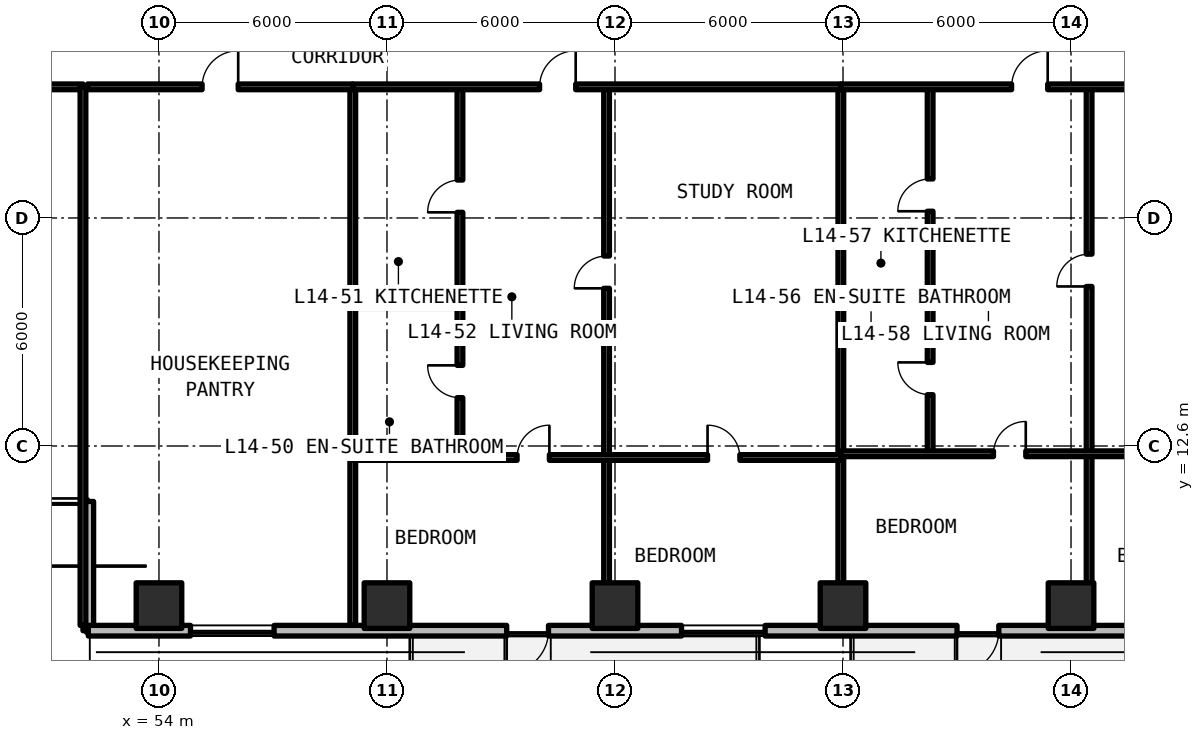
"""IFC4 building model, lengths in metres.
Left out: names, types, materials, properties, quantities, classifications, styles, units other than length and angle.
Written with IfcOpenShell. Run it as: python <this file> out.ifc"""

import sys

from ifc_helpers import new_model, si_unit, direction, frame, frame_2d, origin, origin_2d, place, context, subcontext, project, spatial, rectangle, extrude, element, fill, save


model = new_model("IFC4")
c1 = context("Model", 3, precision=1e-05, world=origin(), true_north=direction((0.0, 1.0)))
c2 = subcontext(c1, "Body", "Model", "MODEL_VIEW")
j1 = project(units=[si_unit("LENGTHUNIT", "METRE"), si_unit("PLANEANGLEUNIT", "RADIAN")], contexts=[c1])
p1 = place(None, origin())
s1 = spatial("IfcSite", under=j1, at=p1, CompositionType="ELEMENT")
p2 = place(p1, origin())
s2 = spatial("IfcBuilding", under=s1, at=p2, CompositionType="ELEMENT")
p3 = place(p2, frame((0.0, 0.0, 52.14)))
s3 = spatial("IfcBuildingStorey", under=s2, at=p3, CompositionType="ELEMENT", Elevation=52.14)
for number, where, z_axis, x_axis in (
    (1, (54.0, 8.4, 0.0), (0.0, 0.0, 1.0), (1.0, 0.0, 0.0)),
    (2, (60.0, 8.4, 0.0), (0.0, 0.0, 1.0), (1.0, 0.0, 0.0)),
    (3, (66.0, 8.4, 0.0), (0.0, 0.0, 1.0), (1.0, 0.0, 0.0)),
    (4, (72.0, 8.4, 0.0), (0.0, 0.0, 1.0), (1.0, 0.0, 0.0)),
    (5, (78.0, 8.4, 0.0), (0.0, 0.0, 1.0), (1.0, 0.0, 0.0)),
):
    element("IfcColumn", number, at=place(p3, frame(where, z_axis=z_axis, x_axis=x_axis)), inside=s3, PredefinedType="COLUMN", context=c2, shape_type="SweptSolid", body=[
        extrude(rectangle(XDim=1.2, YDim=1.2, at=origin_2d()), origin(), (0.0, 0.0, 1.0), 3.3),
    ])
p4 = place(p3, frame((52.14, 11.14, 0.0), z_axis=(0.0, 0.0, 1.0), x_axis=(0.0, -1.0, 0.0)))
e6 = element("IfcWall", 6, at=p4, inside=s3, PredefinedType="SOLIDWALL", context=c2, shape_type="SweptSolid", body=[
    extrude(rectangle(XDim=3.4, YDim=0.28, at=frame_2d((1.7, 0.0))), origin(), (0.0, 0.0, 1.0), 3.08),
])
p5 = place(p3, frame((52.14, 7.74, 0.0), z_axis=(0.0, 0.0, 1.0), x_axis=(1.0, 0.0, 0.0)))
e7 = element("IfcWall", 7, at=p5, inside=s3, PredefinedType="SOLIDWALL", context=c2, shape_type="SweptSolid", body=[
    extrude(rectangle(XDim=44.402, YDim=0.28, at=frame_2d((22.201, 0.0))), origin(), (0.0, 0.0, 1.0), 3.08),
])
p6 = place(p5, frame((11.01, 0.0, 0.0)))
e8 = element("IfcOpeningElement", 8, at=p6, cuts=e7, PredefinedType="OPENING", context=c2, shape_type="SweptSolid", body=[
    extrude(rectangle(XDim=1.1, YDim=2.15, at=frame_2d((0.55, 1.075))), frame((0.0, 0.15, 0.0), z_axis=(0.0, -1.0, 0.0), x_axis=(1.0, 0.0, 0.0)), (0.0, 0.0, 1.0), 0.3),
])
p7 = place(p5, frame((22.86, 0.0, 0.0)))
e9 = element("IfcOpeningElement", 9, at=p7, cuts=e7, PredefinedType="OPENING", context=c2, shape_type="SweptSolid", body=[
    extrude(rectangle(XDim=1.1, YDim=2.15, at=frame_2d((0.55, 1.075))), frame((0.0, 0.15, 0.0), z_axis=(0.0, -1.0, 0.0), x_axis=(1.0, 0.0, 0.0)), (0.0, 0.0, 1.0), 0.3),
])
p8 = place(p5, frame((34.96, 0.0, 0.0)))
e10 = element("IfcOpeningElement", 10, at=p8, cuts=e7, PredefinedType="OPENING", context=c2, shape_type="SweptSolid", body=[
    extrude(rectangle(XDim=1.1, YDim=2.15, at=frame_2d((0.55, 1.075))), frame((0.0, 0.15, 0.0), z_axis=(0.0, -1.0, 0.0), x_axis=(1.0, 0.0, 0.0)), (0.0, 0.0, 1.0), 0.3),
])
p9 = place(p5, frame((2.69, 0.0, 0.78)))
e11 = element("IfcOpeningElement", 11, at=p9, cuts=e7, PredefinedType="OPENING", context=c2, shape_type="SweptSolid", body=[
    extrude(rectangle(XDim=2.2, YDim=1.66, at=frame_2d((1.1, 0.83))), frame((0.0, 0.15, 0.0), z_axis=(0.0, -1.0, 0.0), x_axis=(1.0, 0.0, 0.0)), (0.0, 0.0, 1.0), 0.3),
])
p10 = place(p5, frame((15.61, 0.0, 0.78)))
e12 = element("IfcOpeningElement", 12, at=p10, cuts=e7, PredefinedType="OPENING", context=c2, shape_type="SweptSolid", body=[
    extrude(rectangle(XDim=2.2, YDim=1.66, at=frame_2d((1.1, 0.83))), frame((0.0, 0.15, 0.0), z_axis=(0.0, -1.0, 0.0), x_axis=(1.0, 0.0, 0.0)), (0.0, 0.0, 1.0), 0.3),
])
p11 = place(p5, frame((28.241, 0.0, 0.78)))
e13 = element("IfcOpeningElement", 13, at=p11, cuts=e7, PredefinedType="OPENING", context=c2, shape_type="SweptSolid", body=[
    extrude(rectangle(XDim=2.2, YDim=1.66, at=frame_2d((1.1, 0.83))), frame((0.0, 0.15, 0.0), z_axis=(0.0, -1.0, 0.0), x_axis=(1.0, 0.0, 0.0)), (0.0, 0.0, 1.0), 0.3),
])
p12 = place(p3, frame((43.6, 22.05, 0.0), z_axis=(0.0, 0.0, 1.0), x_axis=(1.0, 0.0, 0.0)))
e14 = element("IfcWall", 14, at=p12, inside=s3, PredefinedType="SOLIDWALL", context=c2, shape_type="SweptSolid", body=[
    extrude(rectangle(XDim=8.4, YDim=0.15, at=frame_2d((4.2, 0.0))), origin(), (0.0, 0.0, 1.0), 2.35),
])
p13 = place(p12, frame((3.65, 0.0, 0.0)))
e15 = element("IfcOpeningElement", 15, at=p13, cuts=e14, PredefinedType="OPENING", context=c2, shape_type="SweptSolid", body=[
    extrude(rectangle(XDim=1.1, YDim=2.15, at=frame_2d((0.55, 1.075))), frame((0.0, 0.085, 0.0), z_axis=(0.0, -1.0, 0.0), x_axis=(1.0, 0.0, 0.0)), (0.0, 0.0, 1.0), 0.17),
])
for number, where, z_axis, x_axis in (
    (16, (52.0, 7.88, 0.0), (0.0, 0.0, 1.0), (0.0, 1.0, 0.0)),
    (17, (59.1, 7.88, 0.0), (0.0, 0.0, 1.0), (0.0, 1.0, 0.0)),
):
    element("IfcWall", number, at=place(p3, frame(where, z_axis=z_axis, x_axis=x_axis)), inside=s3, PredefinedType="SOLIDWALL", context=c2, shape_type="SweptSolid", body=[
        extrude(rectangle(XDim=14.17, YDim=0.15, at=frame_2d((7.085, 0.0))), origin(), (0.0, 0.0, 1.0), 2.35),
    ])
p14 = place(p3, frame((52.12, 22.05, 0.0), z_axis=(0.0, 0.0, 1.0), x_axis=(1.0, 0.0, 0.0)))
e18 = element("IfcWall", 18, at=p14, inside=s3, PredefinedType="SOLIDWALL", context=c2, shape_type="SweptSolid", body=[
    extrude(rectangle(XDim=6.98, YDim=0.15, at=frame_2d((3.49, 0.0))), origin(), (0.0, 0.0, 1.0), 2.35),
])
p15 = place(p14, frame((3.015, 0.0, 0.0)))
e19 = element("IfcOpeningElement", 19, at=p15, cuts=e18, PredefinedType="OPENING", context=c2, shape_type="SweptSolid", body=[
    extrude(rectangle(XDim=0.95, YDim=2.15, at=frame_2d((0.475, 1.075))), frame((0.0, 0.085, 0.0), z_axis=(0.0, -1.0, 0.0), x_axis=(1.0, 0.0, 0.0)), (0.0, 0.0, 1.0), 0.17),
])
p16 = place(p3, frame((71.943, 7.88, 0.0), z_axis=(0.0, 0.0, 1.0), x_axis=(0.0, 1.0, 0.0)))
e20 = element("IfcWall", 20, at=p16, inside=s3, PredefinedType="SOLIDWALL", context=c2, shape_type="SweptSolid", body=[
    extrude(rectangle(XDim=14.17, YDim=0.15, at=frame_2d((7.085, 0.0))), origin(), (0.0, 0.0, 1.0), 2.35),
])
p17 = place(p3, frame((65.778, 12.297, 0.0), z_axis=(0.0, 0.0, 1.0), x_axis=(0.0, 1.0, 0.0)))
e21 = element("IfcWall", 21, at=p17, inside=s3, PredefinedType="PARTITIONING", context=c2, shape_type="SweptSolid", body=[
    extrude(rectangle(XDim=9.753, YDim=0.15, at=frame_2d((4.876, 0.0))), origin(), (0.0, 0.0, 1.0), 2.35),
])
p18 = place(p17, frame((4.451, 0.0, 0.0)))
e22 = element("IfcOpeningElement", 22, at=p18, cuts=e21, PredefinedType="OPENING", context=c2, shape_type="SweptSolid", body=[
    extrude(rectangle(XDim=0.85, YDim=2.1, at=frame_2d((0.425, 1.05))), frame((0.0, 0.085, 0.0), z_axis=(0.0, -1.0, 0.0), x_axis=(1.0, 0.0, 0.0)), (0.0, 0.0, 1.0), 0.17),
])
p19 = place(p3, frame((59.1, 16.296, 0.0), z_axis=(0.0, 0.0, 1.0), x_axis=(1.0, 0.0, 0.0)))
e23 = element("IfcWall", 23, at=p19, inside=s3, PredefinedType="PARTITIONING", context=c2, shape_type="SweptSolid", body=[
    extrude(rectangle(XDim=2.82, YDim=0.15, at=frame_2d((1.41, 0.0))), origin(), (0.0, 0.0, 1.0), 2.35),
])
p20 = place(p3, frame((61.92, 12.297, 0.0), z_axis=(0.0, 0.0, 1.0), x_axis=(0.0, 1.0, 0.0)))
e24 = element("IfcWall", 24, at=p20, inside=s3, PredefinedType="PARTITIONING", context=c2, shape_type="SweptSolid", body=[
    extrude(rectangle(XDim=9.753, YDim=0.15, at=frame_2d((4.876, 0.0))), origin(), (0.0, 0.0, 1.0), 2.35),
])
p21 = place(p20, frame((1.574, 0.0, 0.0)))
e25 = element("IfcOpeningElement", 25, at=p21, cuts=e24, PredefinedType="OPENING", context=c2, shape_type="SweptSolid", body=[
    extrude(rectangle(XDim=0.85, YDim=2.1, at=frame_2d((0.425, 1.05))), frame((0.0, 0.085, 0.0), z_axis=(0.0, -1.0, 0.0), x_axis=(1.0, 0.0, 0.0)), (0.0, 0.0, 1.0), 0.17),
])
p22 = place(p20, frame((6.451, 0.0, 0.0)))
e26 = element("IfcOpeningElement", 26, at=p22, cuts=e24, PredefinedType="OPENING", context=c2, shape_type="SweptSolid", body=[
    extrude(rectangle(XDim=0.85, YDim=2.1, at=frame_2d((0.425, 1.05))), frame((0.0, 0.085, 0.0), z_axis=(0.0, -1.0, 0.0), x_axis=(1.0, 0.0, 0.0)), (0.0, 0.0, 1.0), 0.17),
])
p23 = place(p3, frame((65.778, 7.88, 0.0), z_axis=(0.0, 0.0, 1.0), x_axis=(0.0, 1.0, 0.0)))
e27 = element("IfcWall", 27, at=p23, inside=s3, PredefinedType="PARTITIONING", context=c2, shape_type="SweptSolid", body=[
    extrude(rectangle(XDim=4.417, YDim=0.15, at=frame_2d((2.209, 0.0))), origin(), (0.0, 0.0, 1.0), 2.35),
])
p24 = place(p3, frame((59.1, 12.297, 0.0), z_axis=(0.0, 0.0, 1.0), x_axis=(1.0, 0.0, 0.0)))
e28 = element("IfcWall", 28, at=p24, inside=s3, PredefinedType="PARTITIONING", context=c2, shape_type="SweptSolid", body=[
    extrude(rectangle(XDim=12.843, YDim=0.15, at=frame_2d((6.421, 0.0))), origin(), (0.0, 0.0, 1.0), 2.35),
])
p25 = place(p24, frame((4.324, 0.0, 0.0)))
e29 = element("IfcOpeningElement", 29, at=p25, cuts=e28, PredefinedType="OPENING", context=c2, shape_type="SweptSolid", body=[
    extrude(rectangle(XDim=0.85, YDim=2.1, at=frame_2d((0.425, 1.05))), frame((0.0, 0.085, 0.0), z_axis=(0.0, -1.0, 0.0), x_axis=(1.0, 0.0, 0.0)), (0.0, 0.0, 1.0), 0.17),
])
p26 = place(p24, frame((9.336, 0.0, 0.0)))
e30 = element("IfcOpeningElement", 30, at=p26, cuts=e28, PredefinedType="OPENING", context=c2, shape_type="SweptSolid", body=[
    extrude(rectangle(XDim=0.85, YDim=2.1, at=frame_2d((0.425, 1.05))), frame((0.0, 0.085, 0.0), z_axis=(0.0, -1.0, 0.0), x_axis=(1.0, 0.0, 0.0)), (0.0, 0.0, 1.0), 0.17),
])
p27 = place(p3, frame((59.1, 22.05, 0.0), z_axis=(0.0, 0.0, 1.0), x_axis=(1.0, 0.0, 0.0)))
e31 = element("IfcWall", 31, at=p27, inside=s3, PredefinedType="SOLIDWALL", context=c2, shape_type="SweptSolid", body=[
    extrude(rectangle(XDim=12.843, YDim=0.15, at=frame_2d((6.421, 0.0))), origin(), (0.0, 0.0, 1.0), 2.35),
])
p28 = place(p27, frame((4.916, 0.0, 0.0)))
e32 = element("IfcOpeningElement", 32, at=p28, cuts=e31, PredefinedType="OPENING", context=c2, shape_type="SweptSolid", body=[
    extrude(rectangle(XDim=0.95, YDim=2.15, at=frame_2d((0.475, 1.075))), frame((0.0, 0.085, 0.0), z_axis=(0.0, -1.0, 0.0), x_axis=(1.0, 0.0, 0.0)), (0.0, 0.0, 1.0), 0.17),
])
p29 = place(p3, frame((78.476, 12.396, 0.0), z_axis=(0.0, 0.0, 1.0), x_axis=(0.0, 1.0, 0.0)))
e33 = element("IfcWall", 33, at=p29, inside=s3, PredefinedType="PARTITIONING", context=c2, shape_type="SweptSolid", body=[
    extrude(rectangle(XDim=9.655, YDim=0.15, at=frame_2d((4.827, 0.0))), origin(), (0.0, 0.0, 1.0), 2.35),
])
p30 = place(p29, frame((4.402, 0.0, 0.0)))
e34 = element("IfcOpeningElement", 34, at=p30, cuts=e33, PredefinedType="OPENING", context=c2, shape_type="SweptSolid", body=[
    extrude(rectangle(XDim=0.85, YDim=2.1, at=frame_2d((0.425, 1.05))), frame((0.0, 0.085, 0.0), z_axis=(0.0, -1.0, 0.0), x_axis=(1.0, 0.0, 0.0)), (0.0, 0.0, 1.0), 0.17),
])
p31 = place(p3, frame((71.943, 16.354, 0.0), z_axis=(0.0, 0.0, 1.0), x_axis=(1.0, 0.0, 0.0)))
e35 = element("IfcWall", 35, at=p31, inside=s3, PredefinedType="PARTITIONING", context=c2, shape_type="SweptSolid", body=[
    extrude(rectangle(XDim=2.35, YDim=0.15, at=frame_2d((1.175, 0.0))), origin(), (0.0, 0.0, 1.0), 2.35),
])
p32 = place(p3, frame((74.293, 12.396, 0.0), z_axis=(0.0, 0.0, 1.0), x_axis=(0.0, 1.0, 0.0)))
e36 = element("IfcWall", 36, at=p32, inside=s3, PredefinedType="PARTITIONING", context=c2, shape_type="SweptSolid", body=[
    extrude(rectangle(XDim=9.655, YDim=0.15, at=frame_2d((4.827, 0.0))), origin(), (0.0, 0.0, 1.0), 2.35),
])
p33 = place(p32, frame((1.554, 0.0, 0.0)))
e37 = element("IfcOpeningElement", 37, at=p33, cuts=e36, PredefinedType="OPENING", context=c2, shape_type="SweptSolid", body=[
    extrude(rectangle(XDim=0.85, YDim=2.1, at=frame_2d((0.425, 1.05))), frame((0.0, 0.085, 0.0), z_axis=(0.0, -1.0, 0.0), x_axis=(1.0, 0.0, 0.0)), (0.0, 0.0, 1.0), 0.17),
])
p34 = place(p32, frame((6.381, 0.0, 0.0)))
e38 = element("IfcOpeningElement", 38, at=p34, cuts=e36, PredefinedType="OPENING", context=c2, shape_type="SweptSolid", body=[
    extrude(rectangle(XDim=0.85, YDim=2.1, at=frame_2d((0.425, 1.05))), frame((0.0, 0.085, 0.0), z_axis=(0.0, -1.0, 0.0), x_axis=(1.0, 0.0, 0.0)), (0.0, 0.0, 1.0), 0.17),
])
p35 = place(p3, frame((78.476, 7.88, 0.0), z_axis=(0.0, 0.0, 1.0), x_axis=(0.0, 1.0, 0.0)))
e39 = element("IfcWall", 39, at=p35, inside=s3, PredefinedType="PARTITIONING", context=c2, shape_type="SweptSolid", body=[
    extrude(rectangle(XDim=4.516, YDim=0.15, at=frame_2d((2.258, 0.0))), origin(), (0.0, 0.0, 1.0), 2.35),
])
p36 = place(p3, frame((71.943, 12.396, 0.0), z_axis=(0.0, 0.0, 1.0), x_axis=(1.0, 0.0, 0.0)))
e40 = element("IfcWall", 40, at=p36, inside=s3, PredefinedType="PARTITIONING", context=c2, shape_type="SweptSolid", body=[
    extrude(rectangle(XDim=12.564, YDim=0.15, at=frame_2d((6.282, 0.0))), origin(), (0.0, 0.0, 1.0), 2.35),
])
p37 = place(p36, frame((4.017, 0.0, 0.0)))
e41 = element("IfcOpeningElement", 41, at=p37, cuts=e40, PredefinedType="OPENING", context=c2, shape_type="SweptSolid", body=[
    extrude(rectangle(XDim=0.85, YDim=2.1, at=frame_2d((0.425, 1.05))), frame((0.0, 0.085, 0.0), z_axis=(0.0, -1.0, 0.0), x_axis=(1.0, 0.0, 0.0)), (0.0, 0.0, 1.0), 0.17),
])
p38 = place(p36, frame((9.123, 0.0, 0.0)))
e42 = element("IfcOpeningElement", 42, at=p38, cuts=e40, PredefinedType="OPENING", context=c2, shape_type="SweptSolid", body=[
    extrude(rectangle(XDim=0.85, YDim=2.1, at=frame_2d((0.425, 1.05))), frame((0.0, 0.085, 0.0), z_axis=(0.0, -1.0, 0.0), x_axis=(1.0, 0.0, 0.0)), (0.0, 0.0, 1.0), 0.17),
])
p39 = place(p3, frame((71.943, 22.05, 0.0), z_axis=(0.0, 0.0, 1.0), x_axis=(1.0, 0.0, 0.0)))
e43 = element("IfcWall", 43, at=p39, inside=s3, PredefinedType="SOLIDWALL", context=c2, shape_type="SweptSolid", body=[
    extrude(rectangle(XDim=12.564, YDim=0.15, at=frame_2d((6.282, 0.0))), origin(), (0.0, 0.0, 1.0), 2.35),
])
p40 = place(p39, frame((4.493, 0.0, 0.0)))
e44 = element("IfcOpeningElement", 44, at=p40, cuts=e43, PredefinedType="OPENING", context=c2, shape_type="SweptSolid", body=[
    extrude(rectangle(XDim=0.95, YDim=2.15, at=frame_2d((0.475, 1.075))), frame((0.0, 0.085, 0.0), z_axis=(0.0, -1.0, 0.0), x_axis=(1.0, 0.0, 0.0)), (0.0, 0.0, 1.0), 0.17),
])
p41 = place(p6, frame((1.1, 0.0, 0.0), z_axis=(0.0, 0.0, 1.0), x_axis=(-1.0, 0.0, 0.0)))
e45 = element("IfcDoor", 45, at=p41, inside=s3, OperationType="SINGLE_SWING_LEFT", PredefinedType="DOOR", context=c2, shape_type="SweptSolid", body=[
    extrude(rectangle(XDim=1.1, YDim=2.15, at=frame_2d((0.55, 1.075))), frame((0.0, 0.025, 0.0), z_axis=(0.0, -1.0, 0.0), x_axis=(1.0, 0.0, 0.0)), (0.0, 0.0, 1.0), 0.05),
])
fill(e8, e45)
p42 = place(p7, frame((1.1, 0.0, 0.0), z_axis=(0.0, 0.0, 1.0), x_axis=(-1.0, 0.0, 0.0)))
e46 = element("IfcDoor", 46, at=p42, inside=s3, OperationType="SINGLE_SWING_RIGHT", PredefinedType="DOOR", context=c2, shape_type="SweptSolid", body=[
    extrude(rectangle(XDim=1.1, YDim=2.15, at=frame_2d((0.55, 1.075))), frame((0.0, 0.025, 0.0), z_axis=(0.0, -1.0, 0.0), x_axis=(1.0, 0.0, 0.0)), (0.0, 0.0, 1.0), 0.05),
])
fill(e9, e46)
p43 = place(p9, origin())
e47 = element("IfcWindow", 47, at=p43, inside=s3, PartitioningType="SINGLE_PANEL", PredefinedType="WINDOW", context=c2, shape_type="SweptSolid", body=[
    extrude(rectangle(XDim=2.2, YDim=1.66, at=frame_2d((1.1, 0.83))), frame((0.0, 0.03, 0.0), z_axis=(0.0, -1.0, 0.0), x_axis=(1.0, 0.0, 0.0)), (0.0, 0.0, 1.0), 0.06),
])
fill(e11, e47)
p44 = place(p10, origin())
e48 = element("IfcWindow", 48, at=p44, inside=s3, PartitioningType="SINGLE_PANEL", PredefinedType="WINDOW", context=c2, shape_type="SweptSolid", body=[
    extrude(rectangle(XDim=2.2, YDim=1.66, at=frame_2d((1.1, 0.83))), frame((0.0, 0.03, 0.0), z_axis=(0.0, -1.0, 0.0), x_axis=(1.0, 0.0, 0.0)), (0.0, 0.0, 1.0), 0.06),
])
fill(e12, e48)
p45 = place(p15, origin())
e49 = element("IfcDoor", 49, at=p45, inside=s3, OperationType="SINGLE_SWING_RIGHT", PredefinedType="DOOR", context=c2, shape_type="SweptSolid", body=[
    extrude(rectangle(XDim=0.95, YDim=2.15, at=frame_2d((0.475, 1.075))), frame((0.0, 0.025, 0.0), z_axis=(0.0, -1.0, 0.0), x_axis=(1.0, 0.0, 0.0)), (0.0, 0.0, 1.0), 0.05),
])
fill(e19, e49)
p46 = place(p18, origin())
e50 = element("IfcDoor", 50, at=p46, inside=s3, OperationType="SINGLE_SWING_LEFT", PredefinedType="DOOR", context=c2, shape_type="SweptSolid", body=[
    extrude(rectangle(XDim=0.85, YDim=2.1, at=frame_2d((0.425, 1.05))), frame((0.0, 0.025, 0.0), z_axis=(0.0, -1.0, 0.0), x_axis=(1.0, 0.0, 0.0)), (0.0, 0.0, 1.0), 0.05),
])
fill(e22, e50)
p47 = place(p21, origin())
e51 = element("IfcDoor", 51, at=p47, inside=s3, OperationType="SINGLE_SWING_RIGHT", PredefinedType="DOOR", context=c2, shape_type="SweptSolid", body=[
    extrude(rectangle(XDim=0.85, YDim=2.1, at=frame_2d((0.425, 1.05))), frame((0.0, 0.025, 0.0), z_axis=(0.0, -1.0, 0.0), x_axis=(1.0, 0.0, 0.0)), (0.0, 0.0, 1.0), 0.05),
])
fill(e25, e51)
p48 = place(p22, origin())
e52 = element("IfcDoor", 52, at=p48, inside=s3, OperationType="SINGLE_SWING_LEFT", PredefinedType="DOOR", context=c2, shape_type="SweptSolid", body=[
    extrude(rectangle(XDim=0.85, YDim=2.1, at=frame_2d((0.425, 1.05))), frame((0.0, 0.025, 0.0), z_axis=(0.0, -1.0, 0.0), x_axis=(1.0, 0.0, 0.0)), (0.0, 0.0, 1.0), 0.05),
])
fill(e26, e52)
p49 = place(p25, origin())
e53 = element("IfcDoor", 53, at=p49, inside=s3, OperationType="SINGLE_SWING_RIGHT", PredefinedType="DOOR", context=c2, shape_type="SweptSolid", body=[
    extrude(rectangle(XDim=0.85, YDim=2.1, at=frame_2d((0.425, 1.05))), frame((0.0, 0.025, 0.0), z_axis=(0.0, -1.0, 0.0), x_axis=(1.0, 0.0, 0.0)), (0.0, 0.0, 1.0), 0.05),
])
fill(e29, e53)
p50 = place(p26, origin())
e54 = element("IfcDoor", 54, at=p50, inside=s3, OperationType="SINGLE_SWING_LEFT", PredefinedType="DOOR", context=c2, shape_type="SweptSolid", body=[
    extrude(rectangle(XDim=0.85, YDim=2.1, at=frame_2d((0.425, 1.05))), frame((0.0, 0.025, 0.0), z_axis=(0.0, -1.0, 0.0), x_axis=(1.0, 0.0, 0.0)), (0.0, 0.0, 1.0), 0.05),
])
fill(e30, e54)
p51 = place(p28, origin())
e55 = element("IfcDoor", 55, at=p51, inside=s3, OperationType="SINGLE_SWING_RIGHT", PredefinedType="DOOR", context=c2, shape_type="SweptSolid", body=[
    extrude(rectangle(XDim=0.95, YDim=2.15, at=frame_2d((0.475, 1.075))), frame((0.0, 0.025, 0.0), z_axis=(0.0, -1.0, 0.0), x_axis=(1.0, 0.0, 0.0)), (0.0, 0.0, 1.0), 0.05),
])
fill(e32, e55)
p52 = place(p30, origin())
e56 = element("IfcDoor", 56, at=p52, inside=s3, OperationType="SINGLE_SWING_LEFT", PredefinedType="DOOR", context=c2, shape_type="SweptSolid", body=[
    extrude(rectangle(XDim=0.85, YDim=2.1, at=frame_2d((0.425, 1.05))), frame((0.0, 0.025, 0.0), z_axis=(0.0, -1.0, 0.0), x_axis=(1.0, 0.0, 0.0)), (0.0, 0.0, 1.0), 0.05),
])
fill(e34, e56)
p53 = place(p33, origin())
e57 = element("IfcDoor", 57, at=p53, inside=s3, OperationType="SINGLE_SWING_RIGHT", PredefinedType="DOOR", context=c2, shape_type="SweptSolid", body=[
    extrude(rectangle(XDim=0.85, YDim=2.1, at=frame_2d((0.425, 1.05))), frame((0.0, 0.025, 0.0), z_axis=(0.0, -1.0, 0.0), x_axis=(1.0, 0.0, 0.0)), (0.0, 0.0, 1.0), 0.05),
])
fill(e37, e57)
p54 = place(p34, origin())
e58 = element("IfcDoor", 58, at=p54, inside=s3, OperationType="SINGLE_SWING_LEFT", PredefinedType="DOOR", context=c2, shape_type="SweptSolid", body=[
    extrude(rectangle(XDim=0.85, YDim=2.1, at=frame_2d((0.425, 1.05))), frame((0.0, 0.025, 0.0), z_axis=(0.0, -1.0, 0.0), x_axis=(1.0, 0.0, 0.0)), (0.0, 0.0, 1.0), 0.05),
])
fill(e38, e58)
p55 = place(p37, origin())
e59 = element("IfcDoor", 59, at=p55, inside=s3, OperationType="SINGLE_SWING_RIGHT", PredefinedType="DOOR", context=c2, shape_type="SweptSolid", body=[
    extrude(rectangle(XDim=0.85, YDim=2.1, at=frame_2d((0.425, 1.05))), frame((0.0, 0.025, 0.0), z_axis=(0.0, -1.0, 0.0), x_axis=(1.0, 0.0, 0.0)), (0.0, 0.0, 1.0), 0.05),
])
fill(e41, e59)
p56 = place(p40, origin())
e60 = element("IfcDoor", 60, at=p56, inside=s3, OperationType="SINGLE_SWING_RIGHT", PredefinedType="DOOR", context=c2, shape_type="SweptSolid", body=[
    extrude(rectangle(XDim=0.95, YDim=2.15, at=frame_2d((0.475, 1.075))), frame((0.0, 0.025, 0.0), z_axis=(0.0, -1.0, 0.0), x_axis=(1.0, 0.0, 0.0)), (0.0, 0.0, 1.0), 0.05),
])
fill(e44, e60)
save(model, sys.argv[1])
